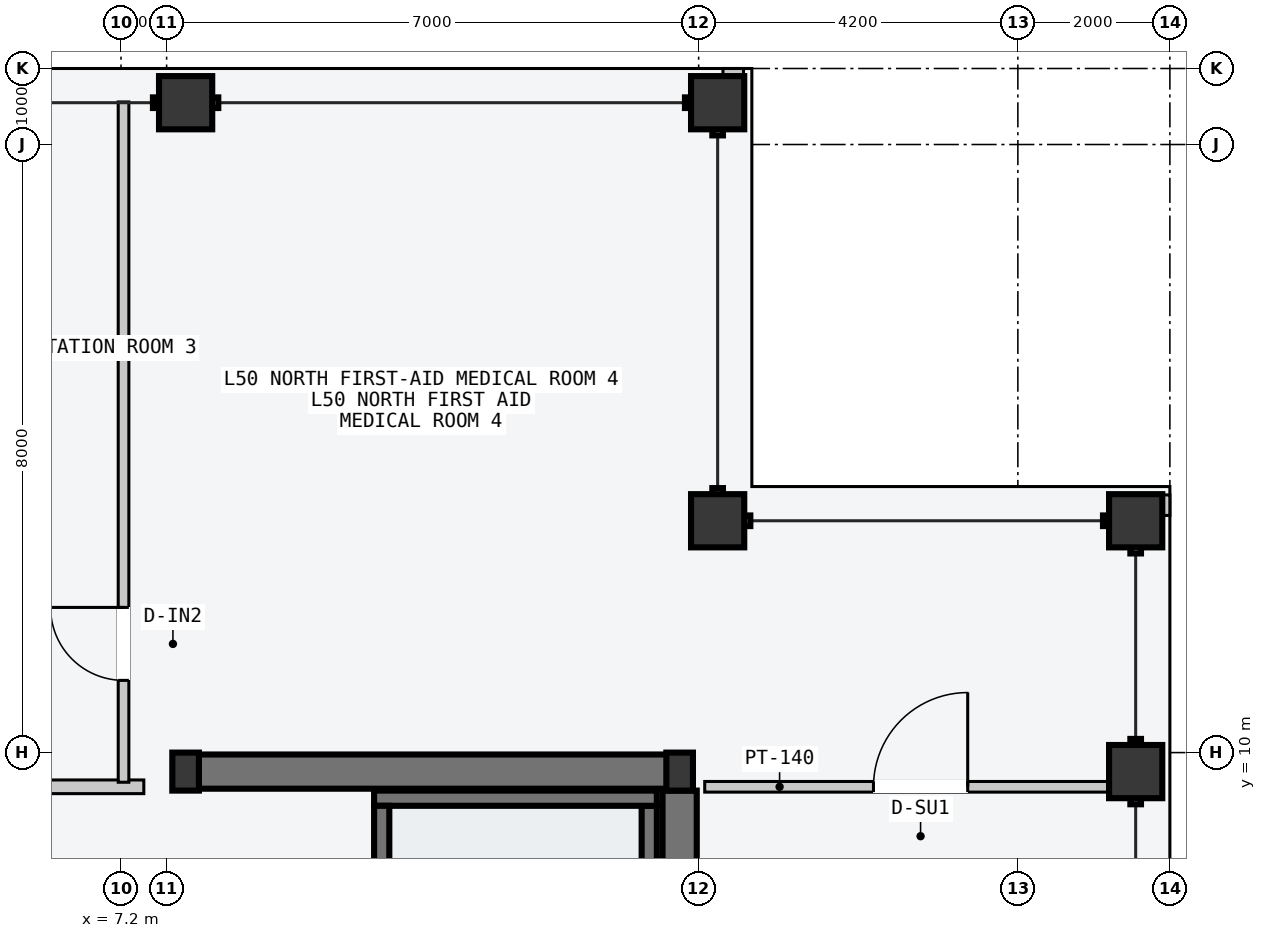
"""IFC4 building model, lengths in metres.
Left out: names, types, materials, properties, quantities, classifications, styles, units other than length and angle.
Written with IfcOpenShell. Run it as: python <this file> out.ifc"""

import sys

from ifc_helpers import new_model, si_unit, direction, frame, frame_2d, origin, origin_2d, place, context, subcontext, project, spatial, rectangle, hollow_rectangle, i_section, extrude, element, fill, save


model = new_model("IFC4")
c1 = context("Model", 3, precision=1e-05, world=origin(), true_north=direction((0.0, 1.0)))
c2 = subcontext(c1, "Body", "Model", "MODEL_VIEW")
j1 = project(units=[si_unit("LENGTHUNIT", "METRE"), si_unit("PLANEANGLEUNIT", "RADIAN")], contexts=[c1])
p1 = place(None, origin())
s1 = spatial("IfcSite", under=j1, at=p1, CompositionType="ELEMENT")
p2 = place(p1, origin())
s2 = spatial("IfcBuilding", under=s1, at=p2, CompositionType="ELEMENT")
p3 = place(p2, frame((0.0, 0.0, 191.1)))
s3 = spatial("IfcBuildingStorey", under=s2, at=p3, CompositionType="ELEMENT", Elevation=191.1)
p4 = place(p3, frame((8.07, 9.75, -0.2), z_axis=(0.0, 0.0, 1.0), x_axis=(1.0, 0.0, 0.0)))
e1 = element("IfcWall", 1, at=p4, inside=s3, PredefinedType="SHEAR", context=c2, shape_type="SweptSolid", body=[
    extrude(rectangle(XDim=6.46, YDim=0.45, at=frame_2d((3.23, 0.0))), origin(), (0.0, 0.0, 1.0), 3.6),
])
p5 = place(p3, frame((14.55, 0.25, -0.2), z_axis=(0.0, 0.0, 1.0), x_axis=(0.0, 1.0, 0.0)))
e2 = element("IfcWall", 2, at=p5, inside=s3, PredefinedType="SHEAR", context=c2, shape_type="SweptSolid", body=[
    extrude(rectangle(XDim=9.25, YDim=0.45, at=frame_2d((4.625, 0.0))), origin(), (0.0, 0.0, 1.0), 3.6),
])
p6 = place(p3, frame((14.15, 1.5, -0.2), z_axis=(0.0, 0.0, 1.0), x_axis=(0.0, 1.0, 0.0)))
e3 = element("IfcWall", 3, at=p6, inside=s3, PredefinedType="SOLIDWALL", context=c2, shape_type="SweptSolid", body=[
    extrude(rectangle(XDim=7.8, YDim=0.2, at=frame_2d((3.9, 0.0))), origin(), (0.0, 0.0, 1.0), 3.6),
])
p7 = place(p3, frame((10.53, 9.4, -0.2), z_axis=(0.0, 0.0, 1.0), x_axis=(1.0, 0.0, 0.0)))
e4 = element("IfcWall", 4, at=p7, inside=s3, PredefinedType="SOLIDWALL", context=c2, shape_type="SweptSolid", body=[
    extrude(rectangle(XDim=3.72, YDim=0.2, at=frame_2d((1.86, 0.0))), origin(), (0.0, 0.0, 1.0), 3.6),
])
p8 = place(p3, frame((10.63, 1.5, -0.2), z_axis=(0.0, 0.0, 1.0), x_axis=(0.0, 1.0, 0.0)))
e5 = element("IfcWall", 5, at=p8, inside=s3, PredefinedType="SOLIDWALL", context=c2, shape_type="SweptSolid", body=[
    extrude(rectangle(XDim=7.8, YDim=0.2, at=frame_2d((3.9, 0.0))), origin(), (0.0, 0.0, 1.0), 3.6),
])
for number, where, z_axis, x_axis in (
    (6, (8.05, 9.75, 0.0), (0.0, 0.0, 1.0), (1.0, 0.0, 0.0)),
    (7, (14.55, 9.75, 0.0), (0.0, 0.0, 1.0), (1.0, 0.0, 0.0)),
):
    element("IfcColumn", number, at=place(p3, frame(where, z_axis=z_axis, x_axis=x_axis)), inside=s3, PredefinedType="COLUMN", context=c2, shape_type="SweptSolid", body=[
        extrude(i_section(OverallWidth=0.35, OverallDepth=0.5, WebThickness=0.02, FlangeThickness=0.032, at=origin_2d()), origin(), (0.0, 0.0, 1.0), 3.6),
    ])
for number, where, z_axis, x_axis in (
    (8, (8.05, 18.55, 0.0), (0.0, 0.0, 1.0), (1.0, 0.0, 0.0)),
    (9, (15.05, 18.55, 0.0), (0.0, 0.0, 1.0), (1.0, 0.0, 0.0)),
    (10, (20.55, 9.75, 0.0), (0.0, 0.0, 1.0), (0.0, 1.0, 0.0)),
    (11, (20.55, 13.05, 0.0), (0.0, 0.0, 1.0), (0.0, 1.0, 0.0)),
    (12, (15.05, 13.05, 0.0), (0.0, 0.0, 1.0), (1.0, 0.0, 0.0)),
):
    element("IfcColumn", number, at=place(p3, frame(where, z_axis=z_axis, x_axis=x_axis)), inside=s3, PredefinedType="COLUMN", context=c2, shape_type="SweptSolid", body=[
        extrude(hollow_rectangle(XDim=0.7, YDim=0.7, WallThickness=0.03, at=origin_2d()), origin(), (0.0, 0.0, 1.0), 3.6),
    ])
for number, where, z_axis, x_axis in (
    (13, (15.12, 18.89, 0.0), (0.0, 0.0, 1.0), (1.0, 0.0, 0.0)),
    (14, (20.89, 13.12, 0.0), (0.0, 0.0, 1.0), (0.0, 1.0, 0.0)),
):
    element("IfcWall", number, at=place(p3, frame(where, z_axis=z_axis, x_axis=x_axis)), inside=s3, PredefinedType="PARAPET", context=c2, shape_type="SweptSolid", body=[
        extrude(rectangle(XDim=0.27, YDim=0.22, at=frame_2d((0.135, 0.0))), origin(), (0.0, 0.0, 1.0), 1.2),
    ])
p9 = place(p3, frame((1.26, 9.55, 0.0), z_axis=(0.0, 0.0, 1.0), x_axis=(1.0, 0.0, 0.0)))
e15 = element("IfcWall", 15, at=p9, inside=s3, PredefinedType="PARTITIONING", context=c2, shape_type="SweptSolid", body=[
    extrude(rectangle(XDim=6.24, YDim=0.18, at=frame_2d((3.12, 0.0))), origin(), (0.0, 0.0, 1.0), 3.4),
])
p10 = place(p3, frame((7.233, 9.61, 0.0), z_axis=(0.0, 0.0, 1.0), x_axis=(0.0, 1.0, 0.0)))
e16 = element("IfcWall", 16, at=p10, inside=s3, PredefinedType="PARTITIONING", context=c2, shape_type="SweptSolid", body=[
    extrude(rectangle(XDim=8.95, YDim=0.14, at=frame_2d((4.475, 0.0))), origin(), (0.0, 0.0, 1.0), 3.4),
])
p11 = place(p10, frame((1.34, 0.0, 0.0)))
e17 = element("IfcOpeningElement", 17, at=p11, cuts=e16, PredefinedType="OPENING", context=c2, shape_type="SweptSolid", body=[
    extrude(rectangle(XDim=0.96, YDim=2.18, at=frame_2d((0.48, 1.09))), frame((0.0, 0.08, 0.0), z_axis=(0.0, -1.0, 0.0), x_axis=(1.0, 0.0, 0.0)), (0.0, 0.0, 1.0), 0.16),
])
p12 = place(p3, frame((14.88, 9.55, 0.0), z_axis=(0.0, 0.0, 1.0), x_axis=(1.0, 0.0, 0.0)))
e18 = element("IfcWall", 18, at=p12, inside=s3, PredefinedType="PARTITIONING", context=c2, shape_type="SweptSolid", body=[
    extrude(rectangle(XDim=5.68, YDim=0.14, at=frame_2d((2.84, 0.0))), origin(), (0.0, 0.0, 1.0), 3.4),
])
p13 = place(p12, frame((2.22, 0.0, 0.0)))
e19 = element("IfcOpeningElement", 19, at=p13, cuts=e18, PredefinedType="OPENING", context=c2, shape_type="SweptSolid", body=[
    extrude(rectangle(XDim=1.24, YDim=2.24, at=frame_2d((0.62, 1.12))), frame((0.0, 0.08, 0.0), z_axis=(0.0, -1.0, 0.0), x_axis=(1.0, 0.0, 0.0)), (0.0, 0.0, 1.0), 0.16),
])
p14 = place(p11, origin())
e20 = element("IfcDoor", 20, at=p14, inside=s3, OperationType="SINGLE_SWING_RIGHT", PredefinedType="DOOR", context=c2, shape_type="SweptSolid", body=[
    extrude(rectangle(XDim=0.96, YDim=2.18, at=frame_2d((0.48, 1.09))), frame((0.0, 0.025, 0.0), z_axis=(0.0, -1.0, 0.0), x_axis=(1.0, 0.0, 0.0)), (0.0, 0.0, 1.0), 0.05),
])
fill(e17, e20)
p15 = place(p13, origin())
e21 = element("IfcDoor", 21, at=p15, inside=s3, OperationType="SINGLE_SWING_RIGHT", PredefinedType="DOOR", context=c2, shape_type="SweptSolid", body=[
    extrude(rectangle(XDim=1.24, YDim=2.24, at=frame_2d((0.62, 1.12))), frame((0.0, 0.025, 0.0), z_axis=(0.0, -1.0, 0.0), x_axis=(1.0, 0.0, 0.0)), (0.0, 0.0, 1.0), 0.05),
])
fill(e19, e21)
save(model, sys.argv[1])
